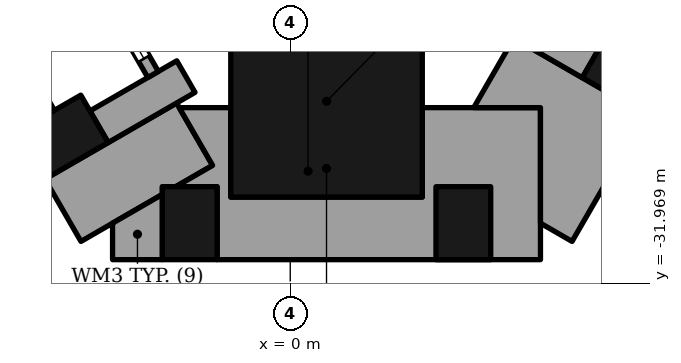
"""IFC4 building model, lengths in metres.
Left out: names, types, materials, properties, quantities, classifications, styles, units other than length and angle.
Written with IfcOpenShell. Run it as: python <this file> out.ifc"""

import sys

from ifc_helpers import new_model, si_unit, direction, frame, frame_2d, origin, origin_2d, place, context, subcontext, project, spatial, polyline, rectangle, outline, extrude, element, fill, save


model = new_model("IFC4")
c1 = context("Model", 3, precision=1e-05, world=origin(), true_north=direction((0.0, 1.0)))
c2 = subcontext(c1, "Body", "Model", "MODEL_VIEW")
j1 = project(units=[si_unit("LENGTHUNIT", "METRE"), si_unit("PLANEANGLEUNIT", "RADIAN")], contexts=[c1])
p1 = place(None, origin())
s1 = spatial("IfcSite", under=j1, at=p1, CompositionType="ELEMENT")
p2 = place(p1, origin())
s2 = spatial("IfcBuilding", under=s1, at=p2, CompositionType="ELEMENT")
p3 = place(p2, frame((0.0, 0.0, 66.4)))
s3 = spatial("IfcBuildingStorey", under=s2, at=p3, CompositionType="ELEMENT", Elevation=66.4)
p4 = place(p3, frame((0.597, -28.973, 0.0), z_axis=(0.0, 0.0, 1.0), x_axis=(0.0, 1.0, 0.0)))
e1 = element("IfcColumn", 1, at=p4, inside=s3, PredefinedType="COLUMN", context=c2, shape_type="SweptSolid", body=[
    extrude(rectangle(XDim=3.15, YDim=3.15, at=origin_2d()), origin(), (0.0, 0.0, 1.0), 3.4),
])
for number, where, z_axis, x_axis in (
    (2, (-3.739, -29.561, 0.0), (0.0, 0.0, 1.0), (0.5, -0.866, 0.0)),
    (3, (-1.653, -30.977, 0.0), (0.0, 0.0, 1.0), (1.0, 0.0, 0.0)),
    (4, (2.847, -30.977, 0.0), (0.0, 0.0, 1.0), (1.0, 0.0, 0.0)),
    (5, (5.548, -28.493, 0.0), (0.0, 0.0, 1.0), (0.5, 0.866, 0.0)),
):
    element("IfcColumn", number, at=place(p3, frame(where, z_axis=z_axis, x_axis=x_axis)), inside=s3, PredefinedType="COLUMN", context=c2, shape_type="SweptSolid", body=[
        extrude(rectangle(XDim=0.9, YDim=1.2, at=origin_2d()), origin(), (0.0, 0.0, 1.0), 3.4),
    ])
p5 = place(p3, frame((-3.145, -29.391, 0.0), z_axis=(0.0, 0.0, 1.0), x_axis=(0.866040211805, 0.499974350878, 0.0)))
e6 = element("IfcWall", 6, at=p5, inside=s3, PredefinedType="SOLIDWALL", context=c2, shape_type="SweptSolid", body=[
    extrude(rectangle(XDim=1.65, YDim=0.6, at=frame_2d((0.825, 0.0))), origin(), (0.0, 0.0, 1.0), 2.63),
])
p6 = place(p3, frame((-5.764, -26.054, 0.0), z_axis=(0.0, 0.0, 1.0), x_axis=(0.500012057535, -0.866018442252, 0.0)))
e7 = element("IfcWall", 7, at=p6, inside=s3, PredefinedType="SOLIDWALL", context=c2, shape_type="SweptSolid", body=[
    extrude(rectangle(XDim=3.6, YDim=0.2, at=frame_2d((1.8, 0.0))), origin(), (0.0, 0.0, 1.0), 2.374),
])
p7 = place(p3, frame((-4.355, -24.894, 0.0), z_axis=(0.0, 0.0, 1.0), x_axis=(0.49998411664, -0.866034573852, 0.0)))
e8 = element("IfcWall", 8, at=p7, inside=s3, PredefinedType="ELEMENTEDWALL", context=c2, shape_type="SweptSolid", body=[
    extrude(rectangle(XDim=4.2, YDim=0.2, at=frame_2d((2.1, 0.0))), origin(), (0.0, 0.0, 1.0), 2.374),
])
p8 = place(p7, frame((0.3, 0.0, 0.6)))
e9 = element("IfcOpeningElement", 9, at=p8, cuts=e8, PredefinedType="OPENING", context=c2, shape_type="SweptSolid", body=[
    extrude(rectangle(XDim=2.1, YDim=1.67, at=frame_2d((1.05, 0.835))), frame((0.0, 0.11, 0.0), z_axis=(0.0, -1.0, 0.0), x_axis=(1.0, 0.0, 0.0)), (0.0, 0.0, 1.0), 0.22),
])
p9 = place(p7, frame((2.7, 0.0, 0.0)))
e10 = element("IfcOpeningElement", 10, at=p9, cuts=e8, PredefinedType="OPENING", context=c2, shape_type="SweptSolid", body=[
    extrude(rectangle(XDim=1.2, YDim=2.27, at=frame_2d((0.6, 1.135))), frame((0.0, 0.11, 0.0), z_axis=(0.0, -1.0, 0.0), x_axis=(1.0, 0.0, 0.0)), (0.0, 0.0, 1.0), 0.22),
])
p10 = place(p3, frame((4.954, -28.325, 0.0), z_axis=(0.0, 0.0, 1.0), x_axis=(-0.866040211805, 0.499974350878, 0.0)))
e11 = element("IfcWall", 11, at=p10, inside=s3, PredefinedType="SOLIDWALL", context=c2, shape_type="SweptSolid", body=[
    extrude(rectangle(XDim=1.65, YDim=0.6, at=frame_2d((0.825, 0.0))), origin(), (0.0, 0.0, 1.0), 2.65),
])
p11 = place(p3, origin())
e12 = element("IfcWall", 12, at=p11, inside=s3, PredefinedType="SOLIDWALL", context=c2, shape_type="SweptSolid", body=[
    extrude(outline(polyline([(-1.277, -30.027), (-1.869, -29.001), (-4.034, -30.251), (-3.442, -31.277), (-2.103, -30.504), (-2.103, -30.377), (-1.883, -30.377), (-1.277, -30.027)])), origin(), (0.0, 0.0, 1.0), 2.63),
])
p12 = place(p3, origin())
e13 = element("IfcWall", 13, at=p12, inside=s3, PredefinedType="SOLIDWALL", context=c2, shape_type="SweptSolid", body=[
    extrude(outline(polyline([(-2.922, -30.977), (-2.922, -31.577), (-2.103, -31.577), (-2.103, -30.504), (-2.922, -30.977)])), origin(), (0.0, 0.0, 1.0), 2.63),
])
p13 = place(p3, origin())
e14 = element("IfcWall", 14, at=p13, inside=s3, PredefinedType="SOLIDWALL", context=c2, shape_type="SweptSolid", body=[
    extrude(outline(polyline([(-1.203, -30.377), (-1.203, -31.577), (4.115, -31.577), (4.115, -29.077), (2.172, -29.077), (2.172, -30.548), (-0.978, -30.548), (-0.978, -29.077), (-1.825, -29.077), (-1.277, -30.027), (-1.883, -30.377), (-1.203, -30.377)])), origin(), (0.0, 0.0, 1.0), 2.63),
])
p14 = place(p3, origin())
e15 = element("IfcWall", 15, at=p14, inside=s3, PredefinedType="SOLIDWALL", context=c2, shape_type="SweptSolid", body=[
    extrude(outline(polyline([(5.843, -29.185), (3.678, -27.935), (3.019, -29.077), (4.115, -29.077), (4.115, -30.977), (4.635, -31.277), (5.843, -29.185)])), origin(), (0.0, 0.0, 1.0), 2.63),
])
p15 = place(p9, origin())
e16 = element("IfcDoor", 16, at=p15, inside=s3, OperationType="SINGLE_SWING_LEFT", PredefinedType="DOOR", context=c2, shape_type="SweptSolid", body=[
    extrude(rectangle(XDim=1.2, YDim=2.27, at=frame_2d((0.6, 1.135))), frame((0.0, 0.025, 0.0), z_axis=(0.0, -1.0, 0.0), x_axis=(1.0, 0.0, 0.0)), (0.0, 0.0, 1.0), 0.05),
])
fill(e10, e16)
save(model, sys.argv[1])
